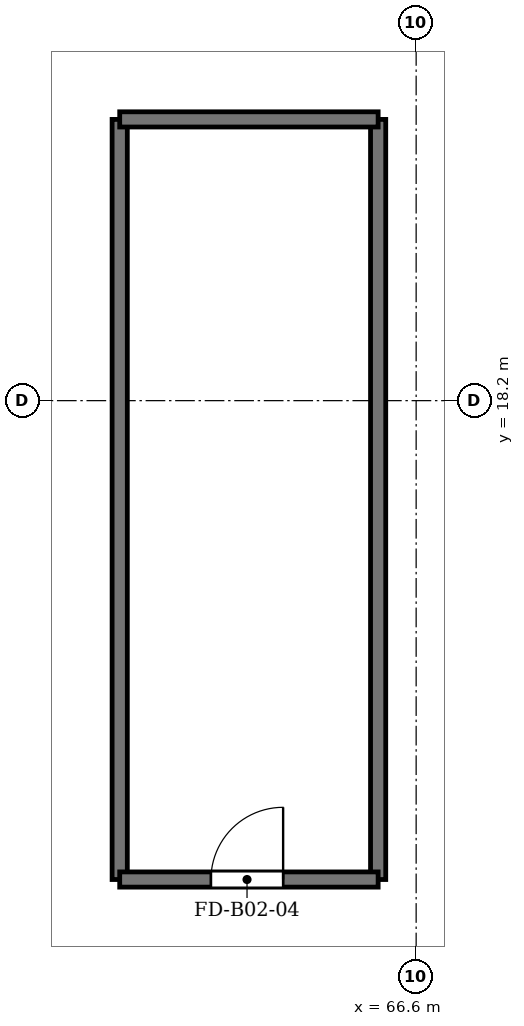
"""IFC4 building model, lengths in metres.
Left out: names, types, materials, properties, quantities, classifications, styles, units other than length and angle.
Written with IfcOpenShell. Run it as: python <this file> out.ifc"""

import sys

from ifc_helpers import new_model, si_unit, direction, frame, frame_2d, origin, place, context, subcontext, project, spatial, rectangle, extrude, source, transform, mapped, element, fill, save


model = new_model("IFC4")
c1 = context("Model", 3, precision=1e-05, world=origin(), true_north=direction((0.0, 1.0)))
c2 = subcontext(c1, "Body", "Model", "MODEL_VIEW")
j1 = project(units=[si_unit("LENGTHUNIT", "METRE"), si_unit("PLANEANGLEUNIT", "RADIAN")], contexts=[c1])
p1 = place(None, origin())
s1 = spatial("IfcSite", under=j1, at=p1, CompositionType="ELEMENT")
p2 = place(p1, origin())
s2 = spatial("IfcBuilding", under=s1, at=p2, CompositionType="ELEMENT")
p3 = place(p2, frame((0.0, 0.0, -8.6)))
s3 = spatial("IfcBuildingStorey", under=s2, at=p3, CompositionType="ELEMENT", Elevation=-8.6)
for number, where, z_axis, x_axis in (
    (1, (62.7, 11.9, 0.0), (0.0, 0.0, 1.0), (0.0, 1.0, 0.0)),
    (2, (66.1, 11.9, 0.0), (0.0, 0.0, 1.0), (0.0, 1.0, 0.0)),
):
    element("IfcWall", number, at=place(p3, frame(where, z_axis=z_axis, x_axis=x_axis)), inside=s3, PredefinedType="SHEAR", context=c2, shape_type="SweptSolid", body=[
        extrude(rectangle(XDim=10.0, YDim=0.2, at=frame_2d((5.0, 0.0))), origin(), (0.0, 0.0, 1.0), 3.98),
    ])
p4 = place(p3, frame((62.7, 11.9, 0.0), z_axis=(0.0, 0.0, 1.0), x_axis=(1.0, 0.0, 0.0)))
e3 = element("IfcWall", 3, at=p4, inside=s3, PredefinedType="SHEAR", context=c2, shape_type="SweptSolid", body=[
    extrude(rectangle(XDim=3.4, YDim=0.2, at=frame_2d((1.7, 0.0))), origin(), (0.0, 0.0, 1.0), 3.98),
])
p5 = place(p4, frame((1.2, 0.0, 0.0)))
e4 = element("IfcOpeningElement", 4, at=p5, cuts=e3, PredefinedType="OPENING", context=c2, shape_type="SweptSolid", body=[
    extrude(rectangle(XDim=0.95, YDim=2.15, at=frame_2d((0.475, 1.075))), frame((0.0, 0.11, 0.0), z_axis=(0.0, -1.0, 0.0), x_axis=(1.0, 0.0, 0.0)), (0.0, 0.0, 1.0), 0.22),
])
p6 = place(p3, frame((62.7, 21.9, 0.0), z_axis=(0.0, 0.0, 1.0), x_axis=(1.0, 0.0, 0.0)))
e5 = element("IfcWall", 5, at=p6, inside=s3, PredefinedType="SHEAR", context=c2, shape_type="SweptSolid", body=[
    extrude(rectangle(XDim=3.4, YDim=0.2, at=frame_2d((1.7, 0.0))), origin(), (0.0, 0.0, 1.0), 3.98),
])
m1 = source(origin(), c2, "Body", "SweptSolid", [
    extrude(rectangle(XDim=0.95, YDim=2.15, at=frame_2d((0.475, 1.075))), frame((0.0, 0.025, 0.0), z_axis=(0.0, -1.0, 0.0), x_axis=(1.0, 0.0, 0.0)), (0.0, 0.0, 1.0), 0.05),
])
p7 = place(p5, origin())
e6 = element("IfcDoor", 6, at=p7, inside=s3, OperationType="SINGLE_SWING_RIGHT", PredefinedType="DOOR", context=c2, shape_type="MappedRepresentation", body=[
    mapped(m1, transform((0.0, 0.0, 0.0), x_axis=(1.0, 0.0, 0.0), y_axis=(0.0, 1.0, 0.0), z_axis=(0.0, 0.0, 1.0), scale=1.0)),
])
fill(e4, e6)
save(model, sys.argv[1])
